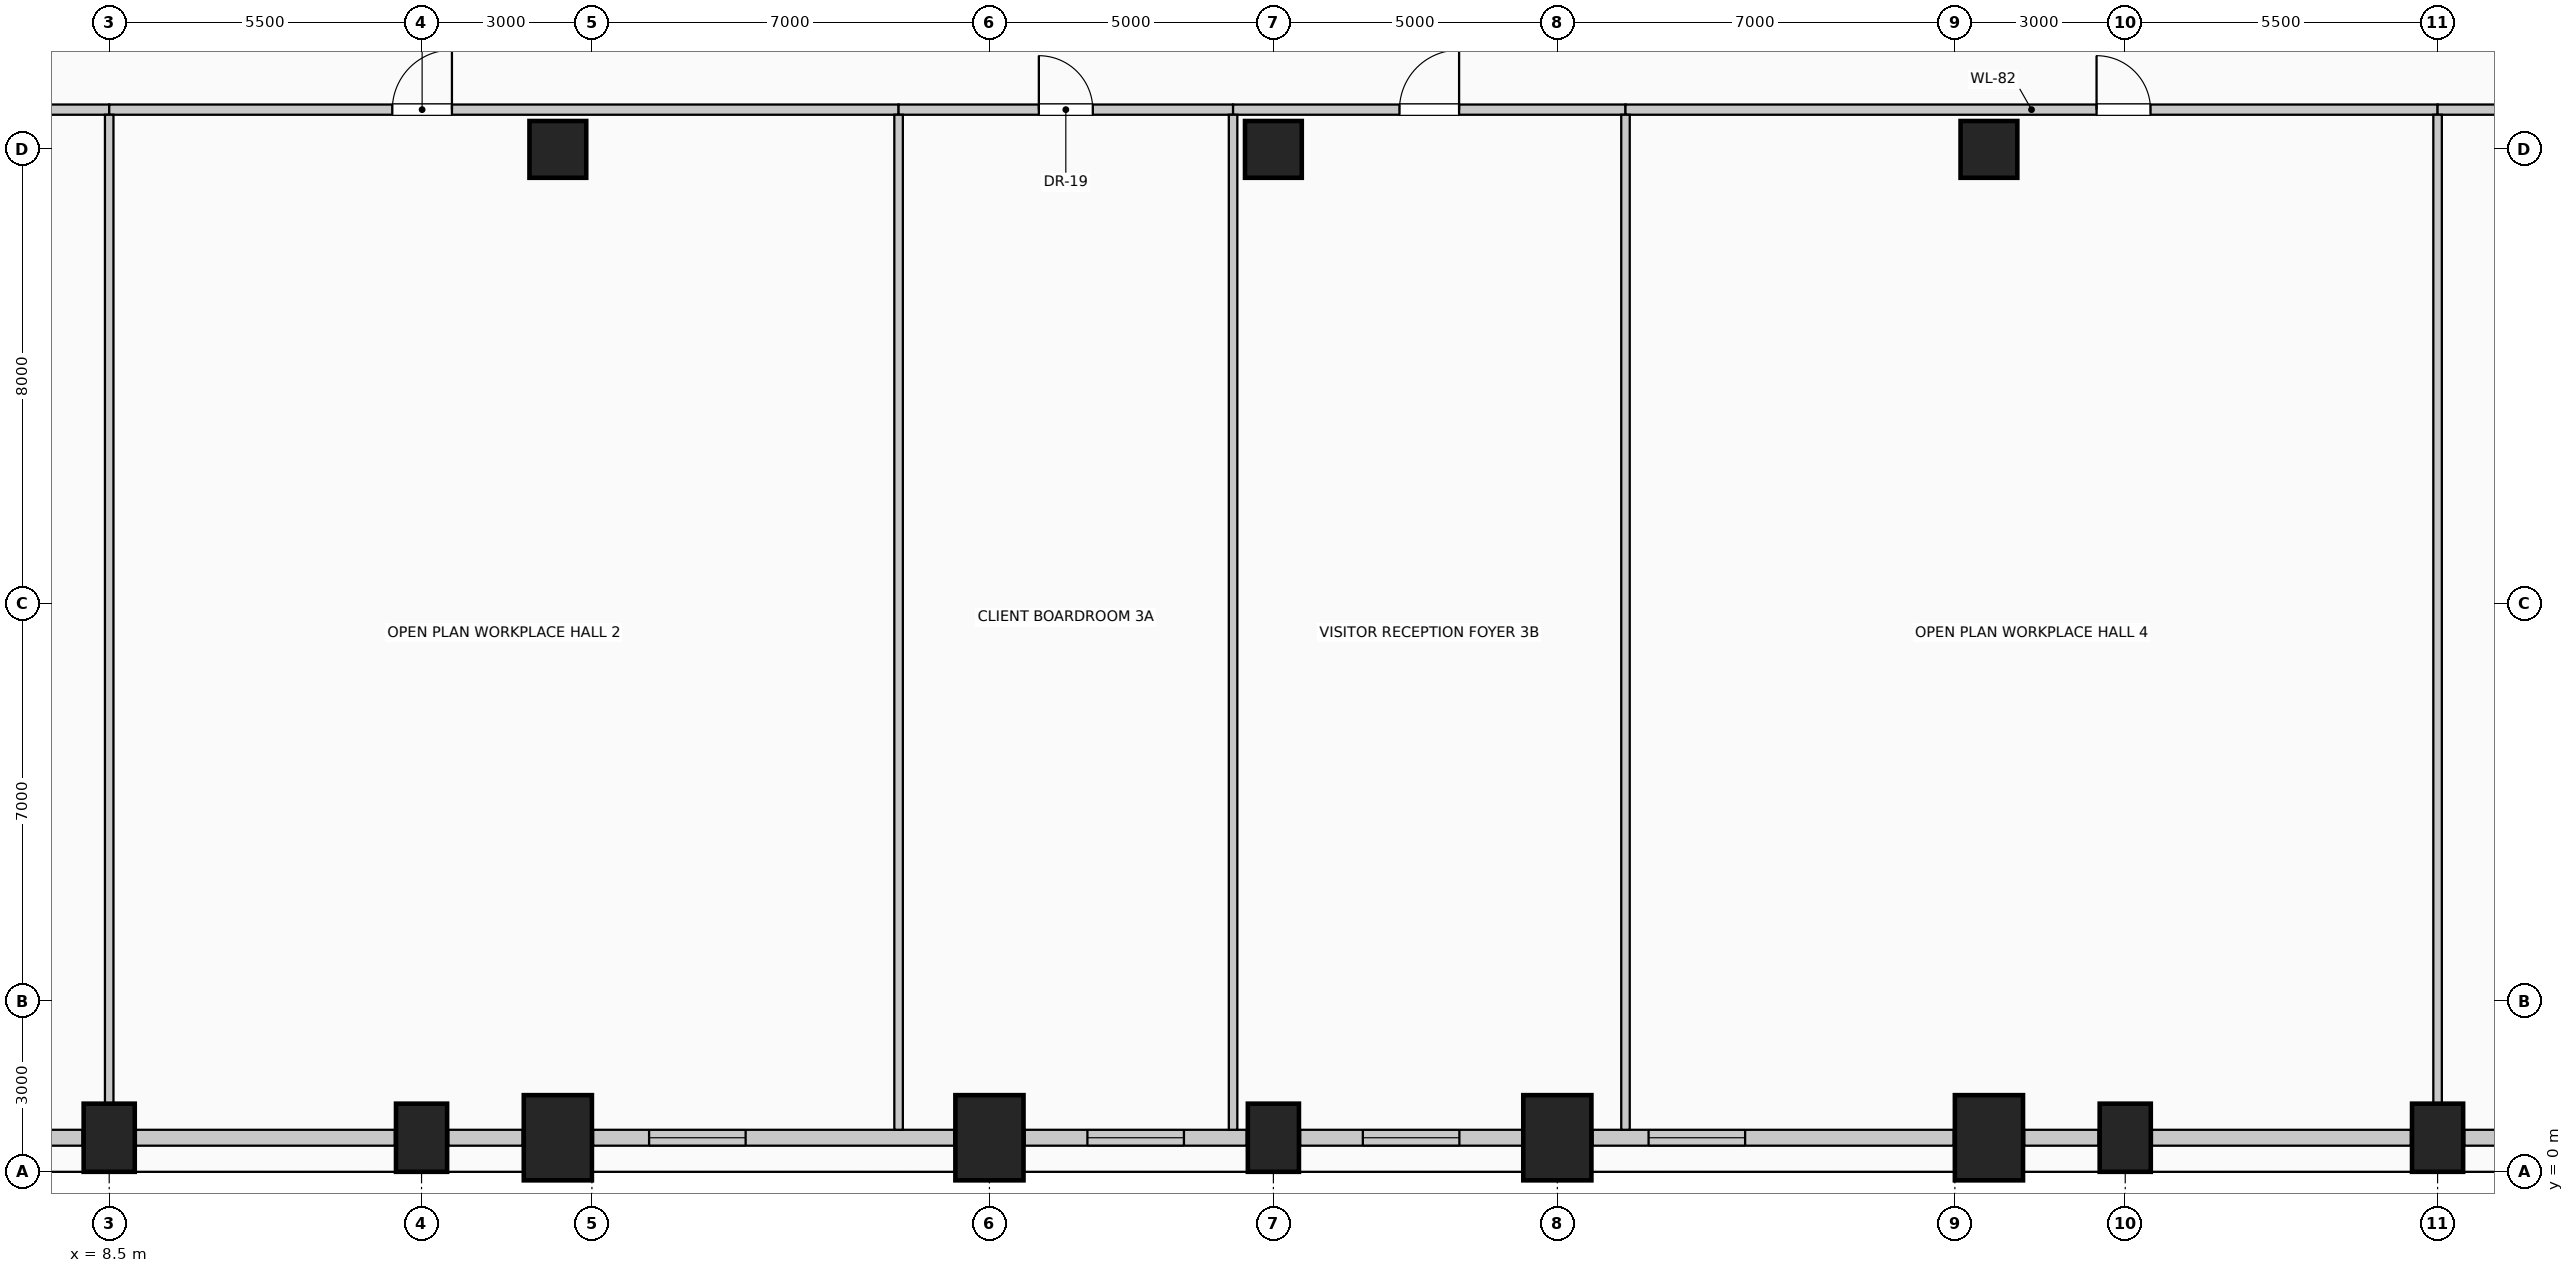
"""IFC4 building model, lengths in metres.
Left out: names, types, materials, properties, quantities, classifications, styles, units other than length and angle.
Written with IfcOpenShell. Run it as: python <this file> out.ifc"""

import sys

from ifc_helpers import new_model, si_unit, direction, frame, frame_2d, origin, origin_2d, place, context, subcontext, project, spatial, rectangle, circle, extrude, element, fill, save


model = new_model("IFC4")
c1 = context("Model", 3, precision=1e-05, world=origin(), true_north=direction((0.0, 1.0)))
c2 = subcontext(c1, "Body", "Model", "MODEL_VIEW")
j1 = project(units=[si_unit("LENGTHUNIT", "METRE"), si_unit("PLANEANGLEUNIT", "RADIAN")], contexts=[c1])
p1 = place(None, origin())
s1 = spatial("IfcSite", under=j1, at=p1, CompositionType="ELEMENT")
p2 = place(p1, origin())
s2 = spatial("IfcBuilding", under=s1, at=p2, CompositionType="ELEMENT")
p3 = place(p2, frame((0.0, 0.0, 70.6)))
s3 = spatial("IfcBuildingStorey", under=s2, at=p3, CompositionType="ELEMENT", Elevation=70.6)
for number, where, z_axis, x_axis in (
    (1, (8.5, 0.6, 0.0), (0.0, 0.0, 1.0), (1.0, 0.0, 0.0)),
    (2, (14.0, 0.6, 0.0), (0.0, 0.0, 1.0), (1.0, 0.0, 0.0)),
):
    element("IfcColumn", number, at=place(p3, frame(where, z_axis=z_axis, x_axis=x_axis)), inside=s3, PredefinedType="COLUMN", context=c2, shape_type="SweptSolid", body=[
        extrude(rectangle(XDim=0.9, YDim=1.2, at=origin_2d()), origin(), (0.0, 0.0, 1.0), 4.0),
    ])
for number, where, z_axis, x_axis in (
    (3, (16.4, 0.6, 0.0), (0.0, 0.0, 1.0), (1.0, 0.0, 0.0)),
    (4, (24.0, 0.6, 0.0), (0.0, 0.0, 1.0), (1.0, 0.0, 0.0)),
):
    element("IfcColumn", number, at=place(p3, frame(where, z_axis=z_axis, x_axis=x_axis)), inside=s3, PredefinedType="COLUMN", context=c2, shape_type="SweptSolid", body=[
        extrude(rectangle(XDim=1.2, YDim=1.5, at=origin_2d()), origin(), (0.0, 0.0, 1.0), 4.0),
    ])
p4 = place(p3, frame((29.0, 0.6, 0.0), z_axis=(0.0, 0.0, 1.0), x_axis=(1.0, 0.0, 0.0)))
e5 = element("IfcColumn", 5, at=p4, inside=s3, PredefinedType="COLUMN", context=c2, shape_type="SweptSolid", body=[
    extrude(rectangle(XDim=0.9, YDim=1.2, at=origin_2d()), origin(), (0.0, 0.0, 1.0), 4.0),
])
for number, where, z_axis, x_axis in (
    (6, (34.0, 0.6, 0.0), (0.0, 0.0, 1.0), (1.0, 0.0, 0.0)),
    (7, (41.6, 0.6, 0.0), (0.0, 0.0, 1.0), (1.0, 0.0, 0.0)),
):
    element("IfcColumn", number, at=place(p3, frame(where, z_axis=z_axis, x_axis=x_axis)), inside=s3, PredefinedType="COLUMN", context=c2, shape_type="SweptSolid", body=[
        extrude(rectangle(XDim=1.2, YDim=1.5, at=origin_2d()), origin(), (0.0, 0.0, 1.0), 4.0),
    ])
for number, where, z_axis, x_axis in (
    (8, (44.0, 0.6, 0.0), (0.0, 0.0, 1.0), (1.0, 0.0, 0.0)),
    (9, (49.5, 0.6, 0.0), (0.0, 0.0, 1.0), (1.0, 0.0, 0.0)),
):
    element("IfcColumn", number, at=place(p3, frame(where, z_axis=z_axis, x_axis=x_axis)), inside=s3, PredefinedType="COLUMN", context=c2, shape_type="SweptSolid", body=[
        extrude(rectangle(XDim=0.9, YDim=1.2, at=origin_2d()), origin(), (0.0, 0.0, 1.0), 4.0),
    ])
for number, where, z_axis, x_axis in (
    (10, (16.4, 18.0, 0.0), (0.0, 0.0, 1.0), (1.0, 0.0, 0.0)),
    (11, (29.0, 18.0, 0.0), (0.0, 0.0, 1.0), (1.0, 0.0, 0.0)),
    (12, (41.6, 18.0, 0.0), (0.0, 0.0, 1.0), (1.0, 0.0, 0.0)),
):
    element("IfcColumn", number, at=place(p3, frame(where, z_axis=z_axis, x_axis=x_axis)), inside=s3, PredefinedType="COLUMN", context=c2, shape_type="SweptSolid", body=[
        extrude(circle(Radius=0.5, at=origin_2d()), origin(), (0.0, 0.0, 1.0), 4.0),
    ])
p5 = place(p3, frame((8.03, 0.6, 0.0), z_axis=(0.0, 0.0, 1.0), x_axis=(-1.0, 0.0, 0.0)))
e13 = element("IfcWall", 13, at=p5, inside=s3, PredefinedType="SOLIDWALL", context=c2, shape_type="SweptSolid", body=[
    extrude(rectangle(XDim=3.96, YDim=0.28, at=frame_2d((1.98, 0.0))), origin(), (0.0, 0.0, 1.0), 2.85),
])
p6 = place(p5, frame((1.13, 0.0, 0.5)))
e14 = element("IfcOpeningElement", 14, at=p6, cuts=e13, PredefinedType="OPENING", context=c2, shape_type="SweptSolid", body=[
    extrude(rectangle(XDim=1.7, YDim=1.95, at=frame_2d((0.85, 0.975))), frame((0.0, 0.15, 0.0), z_axis=(0.0, -1.0, 0.0), x_axis=(1.0, 0.0, 0.0)), (0.0, 0.0, 1.0), 0.3),
])
p7 = place(p3, frame((13.53, 0.6, 0.0), z_axis=(0.0, 0.0, 1.0), x_axis=(-1.0, 0.0, 0.0)))
e15 = element("IfcWall", 15, at=p7, inside=s3, PredefinedType="SOLIDWALL", context=c2, shape_type="SweptSolid", body=[
    extrude(rectangle(XDim=4.56, YDim=0.28, at=frame_2d((2.28, 0.0))), origin(), (0.0, 0.0, 1.0), 2.85),
])
p8 = place(p3, frame((15.78, 0.6, 0.0), z_axis=(0.0, 0.0, 1.0), x_axis=(-1.0, 0.0, 0.0)))
e16 = element("IfcWall", 16, at=p8, inside=s3, PredefinedType="SOLIDWALL", context=c2, shape_type="SweptSolid", body=[
    extrude(rectangle(XDim=1.31, YDim=0.28, at=frame_2d((0.655, 0.0))), origin(), (0.0, 0.0, 1.0), 2.85),
])
p9 = place(p3, frame((23.38, 0.6, 0.0), z_axis=(0.0, 0.0, 1.0), x_axis=(-1.0, 0.0, 0.0)))
e17 = element("IfcWall", 17, at=p9, inside=s3, PredefinedType="SOLIDWALL", context=c2, shape_type="SweptSolid", body=[
    extrude(rectangle(XDim=6.36, YDim=0.28, at=frame_2d((3.18, 0.0))), origin(), (0.0, 0.0, 1.0), 2.85),
])
p10 = place(p9, frame((3.673, 0.0, 0.5)))
e18 = element("IfcOpeningElement", 18, at=p10, cuts=e17, PredefinedType="OPENING", context=c2, shape_type="SweptSolid", body=[
    extrude(rectangle(XDim=1.7, YDim=1.95, at=frame_2d((0.85, 0.975))), frame((0.0, 0.15, 0.0), z_axis=(0.0, -1.0, 0.0), x_axis=(1.0, 0.0, 0.0)), (0.0, 0.0, 1.0), 0.3),
])
p11 = place(p3, frame((28.53, 0.6, 0.0), z_axis=(0.0, 0.0, 1.0), x_axis=(-1.0, 0.0, 0.0)))
e19 = element("IfcWall", 19, at=p11, inside=s3, PredefinedType="SOLIDWALL", context=c2, shape_type="SweptSolid", body=[
    extrude(rectangle(XDim=3.91, YDim=0.28, at=frame_2d((1.955, 0.0))), origin(), (0.0, 0.0, 1.0), 2.85),
])
p12 = place(p11, frame((1.105, 0.0, 0.5)))
e20 = element("IfcOpeningElement", 20, at=p12, cuts=e19, PredefinedType="OPENING", context=c2, shape_type="SweptSolid", body=[
    extrude(rectangle(XDim=1.7, YDim=1.95, at=frame_2d((0.85, 0.975))), frame((0.0, 0.15, 0.0), z_axis=(0.0, -1.0, 0.0), x_axis=(1.0, 0.0, 0.0)), (0.0, 0.0, 1.0), 0.3),
])
p13 = place(p3, frame((33.38, 0.6, 0.0), z_axis=(0.0, 0.0, 1.0), x_axis=(-1.0, 0.0, 0.0)))
e21 = element("IfcWall", 21, at=p13, inside=s3, PredefinedType="SOLIDWALL", context=c2, shape_type="SweptSolid", body=[
    extrude(rectangle(XDim=3.91, YDim=0.28, at=frame_2d((1.955, 0.0))), origin(), (0.0, 0.0, 1.0), 2.85),
])
p14 = place(p13, frame((1.105, 0.0, 0.5)))
e22 = element("IfcOpeningElement", 22, at=p14, cuts=e21, PredefinedType="OPENING", context=c2, shape_type="SweptSolid", body=[
    extrude(rectangle(XDim=1.7, YDim=1.95, at=frame_2d((0.85, 0.975))), frame((0.0, 0.15, 0.0), z_axis=(0.0, -1.0, 0.0), x_axis=(1.0, 0.0, 0.0)), (0.0, 0.0, 1.0), 0.3),
])
p15 = place(p3, frame((40.98, 0.6, 0.0), z_axis=(0.0, 0.0, 1.0), x_axis=(-1.0, 0.0, 0.0)))
e23 = element("IfcWall", 23, at=p15, inside=s3, PredefinedType="SOLIDWALL", context=c2, shape_type="SweptSolid", body=[
    extrude(rectangle(XDim=6.36, YDim=0.28, at=frame_2d((3.18, 0.0))), origin(), (0.0, 0.0, 1.0), 2.85),
])
p16 = place(p15, frame((3.673, 0.0, 0.5)))
e24 = element("IfcOpeningElement", 24, at=p16, cuts=e23, PredefinedType="OPENING", context=c2, shape_type="SweptSolid", body=[
    extrude(rectangle(XDim=1.7, YDim=1.95, at=frame_2d((0.85, 0.975))), frame((0.0, 0.15, 0.0), z_axis=(0.0, -1.0, 0.0), x_axis=(1.0, 0.0, 0.0)), (0.0, 0.0, 1.0), 0.3),
])
p17 = place(p3, frame((43.53, 0.6, 0.0), z_axis=(0.0, 0.0, 1.0), x_axis=(-1.0, 0.0, 0.0)))
e25 = element("IfcWall", 25, at=p17, inside=s3, PredefinedType="SOLIDWALL", context=c2, shape_type="SweptSolid", body=[
    extrude(rectangle(XDim=1.31, YDim=0.28, at=frame_2d((0.655, 0.0))), origin(), (0.0, 0.0, 1.0), 2.85),
])
p18 = place(p3, frame((49.03, 0.6, 0.0), z_axis=(0.0, 0.0, 1.0), x_axis=(-1.0, 0.0, 0.0)))
e26 = element("IfcWall", 26, at=p18, inside=s3, PredefinedType="SOLIDWALL", context=c2, shape_type="SweptSolid", body=[
    extrude(rectangle(XDim=4.56, YDim=0.28, at=frame_2d((2.28, 0.0))), origin(), (0.0, 0.0, 1.0), 2.85),
])
p19 = place(p3, frame((53.93, 0.6, 0.0), z_axis=(0.0, 0.0, 1.0), x_axis=(-1.0, 0.0, 0.0)))
e27 = element("IfcWall", 27, at=p19, inside=s3, PredefinedType="SOLIDWALL", context=c2, shape_type="SweptSolid", body=[
    extrude(rectangle(XDim=3.96, YDim=0.28, at=frame_2d((1.98, 0.0))), origin(), (0.0, 0.0, 1.0), 2.85),
])
p20 = place(p19, frame((1.13, 0.0, 0.5)))
e28 = element("IfcOpeningElement", 28, at=p20, cuts=e27, PredefinedType="OPENING", context=c2, shape_type="SweptSolid", body=[
    extrude(rectangle(XDim=1.7, YDim=1.95, at=frame_2d((0.85, 0.975))), frame((0.0, 0.15, 0.0), z_axis=(0.0, -1.0, 0.0), x_axis=(1.0, 0.0, 0.0)), (0.0, 0.0, 1.0), 0.3),
])
p21 = place(p3, frame((0.74, 18.7, 0.0), z_axis=(0.0, 0.0, 1.0), x_axis=(1.0, 0.0, 0.0)))
e29 = element("IfcWall", 29, at=p21, inside=s3, PredefinedType="PARTITIONING", context=c2, shape_type="SweptSolid", body=[
    extrude(rectangle(XDim=7.76, YDim=0.18, at=frame_2d((3.88, 0.0))), origin(), (0.0, 0.0, 1.0), 3.7),
])
p22 = place(p21, frame((3.405, 0.0, 0.0)))
e30 = element("IfcOpeningElement", 30, at=p22, cuts=e29, PredefinedType="OPENING", context=c2, shape_type="SweptSolid", body=[
    extrude(rectangle(XDim=0.95, YDim=2.15, at=frame_2d((0.475, 1.075))), frame((0.0, 0.1, 0.0), z_axis=(0.0, -1.0, 0.0), x_axis=(1.0, 0.0, 0.0)), (0.0, 0.0, 1.0), 0.2),
])
p23 = place(p3, frame((8.5, 18.7, 0.0), z_axis=(0.0, 0.0, 1.0), x_axis=(1.0, 0.0, 0.0)))
e31 = element("IfcWall", 31, at=p23, inside=s3, PredefinedType="PARTITIONING", context=c2, shape_type="SweptSolid", body=[
    extrude(rectangle(XDim=13.9, YDim=0.18, at=frame_2d((6.95, 0.0))), origin(), (0.0, 0.0, 1.0), 3.7),
])
p24 = place(p23, frame((4.985, 0.0, 0.0)))
e32 = element("IfcOpeningElement", 32, at=p24, cuts=e31, PredefinedType="OPENING", context=c2, shape_type="SweptSolid", body=[
    extrude(rectangle(XDim=1.05, YDim=2.15, at=frame_2d((0.525, 1.075))), frame((0.0, 0.1, 0.0), z_axis=(0.0, -1.0, 0.0), x_axis=(1.0, 0.0, 0.0)), (0.0, 0.0, 1.0), 0.2),
])
p25 = place(p3, frame((22.4, 18.7, 0.0), z_axis=(0.0, 0.0, 1.0), x_axis=(1.0, 0.0, 0.0)))
e33 = element("IfcWall", 33, at=p25, inside=s3, PredefinedType="PARTITIONING", context=c2, shape_type="SweptSolid", body=[
    extrude(rectangle(XDim=5.89, YDim=0.18, at=frame_2d((2.945, 0.0))), origin(), (0.0, 0.0, 1.0), 3.7),
])
p26 = place(p25, frame((2.47, 0.0, 0.0)))
e34 = element("IfcOpeningElement", 34, at=p26, cuts=e33, PredefinedType="OPENING", context=c2, shape_type="SweptSolid", body=[
    extrude(rectangle(XDim=0.95, YDim=2.15, at=frame_2d((0.475, 1.075))), frame((0.0, 0.1, 0.0), z_axis=(0.0, -1.0, 0.0), x_axis=(1.0, 0.0, 0.0)), (0.0, 0.0, 1.0), 0.2),
])
p27 = place(p3, frame((28.29, 18.7, 0.0), z_axis=(0.0, 0.0, 1.0), x_axis=(1.0, 0.0, 0.0)))
e35 = element("IfcWall", 35, at=p27, inside=s3, PredefinedType="PARTITIONING", context=c2, shape_type="SweptSolid", body=[
    extrude(rectangle(XDim=6.91, YDim=0.18, at=frame_2d((3.455, 0.0))), origin(), (0.0, 0.0, 1.0), 3.7),
])
p28 = place(p27, frame((2.93, 0.0, 0.0)))
e36 = element("IfcOpeningElement", 36, at=p28, cuts=e35, PredefinedType="OPENING", context=c2, shape_type="SweptSolid", body=[
    extrude(rectangle(XDim=1.05, YDim=2.15, at=frame_2d((0.525, 1.075))), frame((0.0, 0.1, 0.0), z_axis=(0.0, -1.0, 0.0), x_axis=(1.0, 0.0, 0.0)), (0.0, 0.0, 1.0), 0.2),
])
p29 = place(p3, frame((35.2, 18.7, 0.0), z_axis=(0.0, 0.0, 1.0), x_axis=(1.0, 0.0, 0.0)))
e37 = element("IfcWall", 37, at=p29, inside=s3, PredefinedType="PARTITIONING", context=c2, shape_type="SweptSolid", body=[
    extrude(rectangle(XDim=14.3, YDim=0.18, at=frame_2d((7.15, 0.0))), origin(), (0.0, 0.0, 1.0), 3.7),
])
p30 = place(p29, frame((8.295, 0.0, 0.0)))
e38 = element("IfcOpeningElement", 38, at=p30, cuts=e37, PredefinedType="OPENING", context=c2, shape_type="SweptSolid", body=[
    extrude(rectangle(XDim=0.95, YDim=2.15, at=frame_2d((0.475, 1.075))), frame((0.0, 0.1, 0.0), z_axis=(0.0, -1.0, 0.0), x_axis=(1.0, 0.0, 0.0)), (0.0, 0.0, 1.0), 0.2),
])
p31 = place(p3, frame((49.5, 18.7, 0.0), z_axis=(0.0, 0.0, 1.0), x_axis=(1.0, 0.0, 0.0)))
e39 = element("IfcWall", 39, at=p31, inside=s3, PredefinedType="PARTITIONING", context=c2, shape_type="SweptSolid", body=[
    extrude(rectangle(XDim=7.76, YDim=0.18, at=frame_2d((3.88, 0.0))), origin(), (0.0, 0.0, 1.0), 3.7),
])
p32 = place(p31, frame((3.355, 0.0, 0.0)))
e40 = element("IfcOpeningElement", 40, at=p32, cuts=e39, PredefinedType="OPENING", context=c2, shape_type="SweptSolid", body=[
    extrude(rectangle(XDim=1.05, YDim=2.15, at=frame_2d((0.525, 1.075))), frame((0.0, 0.1, 0.0), z_axis=(0.0, -1.0, 0.0), x_axis=(1.0, 0.0, 0.0)), (0.0, 0.0, 1.0), 0.2),
])
p33 = place(p3, frame((8.5, 1.2, 0.0), z_axis=(0.0, 0.0, 1.0), x_axis=(0.0, 1.0, 0.0)))
e41 = element("IfcWall", 41, at=p33, inside=s3, PredefinedType="PARTITIONING", context=c2, shape_type="SweptSolid", body=[
    extrude(rectangle(XDim=17.41, YDim=0.15, at=frame_2d((8.705, 0.0))), origin(), (0.0, 0.0, 1.0), 3.7),
])
for number, where, z_axis, x_axis in (
    (42, (22.4, 0.74, 0.0), (0.0, 0.0, 1.0), (0.0, 1.0, 0.0)),
    (43, (28.29, 0.74, 0.0), (0.0, 0.0, 1.0), (0.0, 1.0, 0.0)),
    (44, (35.2, 0.74, 0.0), (0.0, 0.0, 1.0), (0.0, 1.0, 0.0)),
):
    element("IfcWall", number, at=place(p3, frame(where, z_axis=z_axis, x_axis=x_axis)), inside=s3, PredefinedType="PARTITIONING", context=c2, shape_type="SweptSolid", body=[
        extrude(rectangle(XDim=17.87, YDim=0.15, at=frame_2d((8.935, 0.0))), origin(), (0.0, 0.0, 1.0), 3.7),
    ])
p34 = place(p3, frame((49.5, 1.2, 0.0), z_axis=(0.0, 0.0, 1.0), x_axis=(0.0, 1.0, 0.0)))
e45 = element("IfcWall", 45, at=p34, inside=s3, PredefinedType="PARTITIONING", context=c2, shape_type="SweptSolid", body=[
    extrude(rectangle(XDim=17.41, YDim=0.15, at=frame_2d((8.705, 0.0))), origin(), (0.0, 0.0, 1.0), 3.7),
])
p35 = place(p10, origin())
e46 = element("IfcWindow", 46, at=p35, inside=s3, PartitioningType="SINGLE_PANEL", PredefinedType="WINDOW", context=c2, shape_type="SweptSolid", body=[
    extrude(rectangle(XDim=1.7, YDim=1.95, at=frame_2d((0.85, 0.975))), frame((0.0, 0.03, 0.0), z_axis=(0.0, -1.0, 0.0), x_axis=(1.0, 0.0, 0.0)), (0.0, 0.0, 1.0), 0.06),
])
fill(e18, e46)
p36 = place(p12, origin())
e47 = element("IfcWindow", 47, at=p36, inside=s3, PartitioningType="SINGLE_PANEL", PredefinedType="WINDOW", context=c2, shape_type="SweptSolid", body=[
    extrude(rectangle(XDim=1.7, YDim=1.95, at=frame_2d((0.85, 0.975))), frame((0.0, 0.03, 0.0), z_axis=(0.0, -1.0, 0.0), x_axis=(1.0, 0.0, 0.0)), (0.0, 0.0, 1.0), 0.06),
])
fill(e20, e47)
p37 = place(p14, origin())
e48 = element("IfcWindow", 48, at=p37, inside=s3, PartitioningType="SINGLE_PANEL", PredefinedType="WINDOW", context=c2, shape_type="SweptSolid", body=[
    extrude(rectangle(XDim=1.7, YDim=1.95, at=frame_2d((0.85, 0.975))), frame((0.0, 0.03, 0.0), z_axis=(0.0, -1.0, 0.0), x_axis=(1.0, 0.0, 0.0)), (0.0, 0.0, 1.0), 0.06),
])
fill(e22, e48)
p38 = place(p16, origin())
e49 = element("IfcWindow", 49, at=p38, inside=s3, PartitioningType="SINGLE_PANEL", PredefinedType="WINDOW", context=c2, shape_type="SweptSolid", body=[
    extrude(rectangle(XDim=1.7, YDim=1.95, at=frame_2d((0.85, 0.975))), frame((0.0, 0.03, 0.0), z_axis=(0.0, -1.0, 0.0), x_axis=(1.0, 0.0, 0.0)), (0.0, 0.0, 1.0), 0.06),
])
fill(e24, e49)
p39 = place(p24, origin())
e50 = element("IfcDoor", 50, at=p39, inside=s3, OperationType="SINGLE_SWING_RIGHT", PredefinedType="DOOR", context=c2, shape_type="SweptSolid", body=[
    extrude(rectangle(XDim=1.05, YDim=2.15, at=frame_2d((0.525, 1.075))), frame((0.0, 0.025, 0.0), z_axis=(0.0, -1.0, 0.0), x_axis=(1.0, 0.0, 0.0)), (0.0, 0.0, 1.0), 0.05),
])
fill(e32, e50)
p40 = place(p26, origin())
e51 = element("IfcDoor", 51, at=p40, inside=s3, OperationType="SINGLE_SWING_LEFT", PredefinedType="DOOR", context=c2, shape_type="SweptSolid", body=[
    extrude(rectangle(XDim=0.95, YDim=2.15, at=frame_2d((0.475, 1.075))), frame((0.0, 0.025, 0.0), z_axis=(0.0, -1.0, 0.0), x_axis=(1.0, 0.0, 0.0)), (0.0, 0.0, 1.0), 0.05),
])
fill(e34, e51)
p41 = place(p28, origin())
e52 = element("IfcDoor", 52, at=p41, inside=s3, OperationType="SINGLE_SWING_RIGHT", PredefinedType="DOOR", context=c2, shape_type="SweptSolid", body=[
    extrude(rectangle(XDim=1.05, YDim=2.15, at=frame_2d((0.525, 1.075))), frame((0.0, 0.025, 0.0), z_axis=(0.0, -1.0, 0.0), x_axis=(1.0, 0.0, 0.0)), (0.0, 0.0, 1.0), 0.05),
])
fill(e36, e52)
p42 = place(p30, origin())
e53 = element("IfcDoor", 53, at=p42, inside=s3, OperationType="SINGLE_SWING_LEFT", PredefinedType="DOOR", context=c2, shape_type="SweptSolid", body=[
    extrude(rectangle(XDim=0.95, YDim=2.15, at=frame_2d((0.475, 1.075))), frame((0.0, 0.025, 0.0), z_axis=(0.0, -1.0, 0.0), x_axis=(1.0, 0.0, 0.0)), (0.0, 0.0, 1.0), 0.05),
])
fill(e38, e53)
save(model, sys.argv[1])
